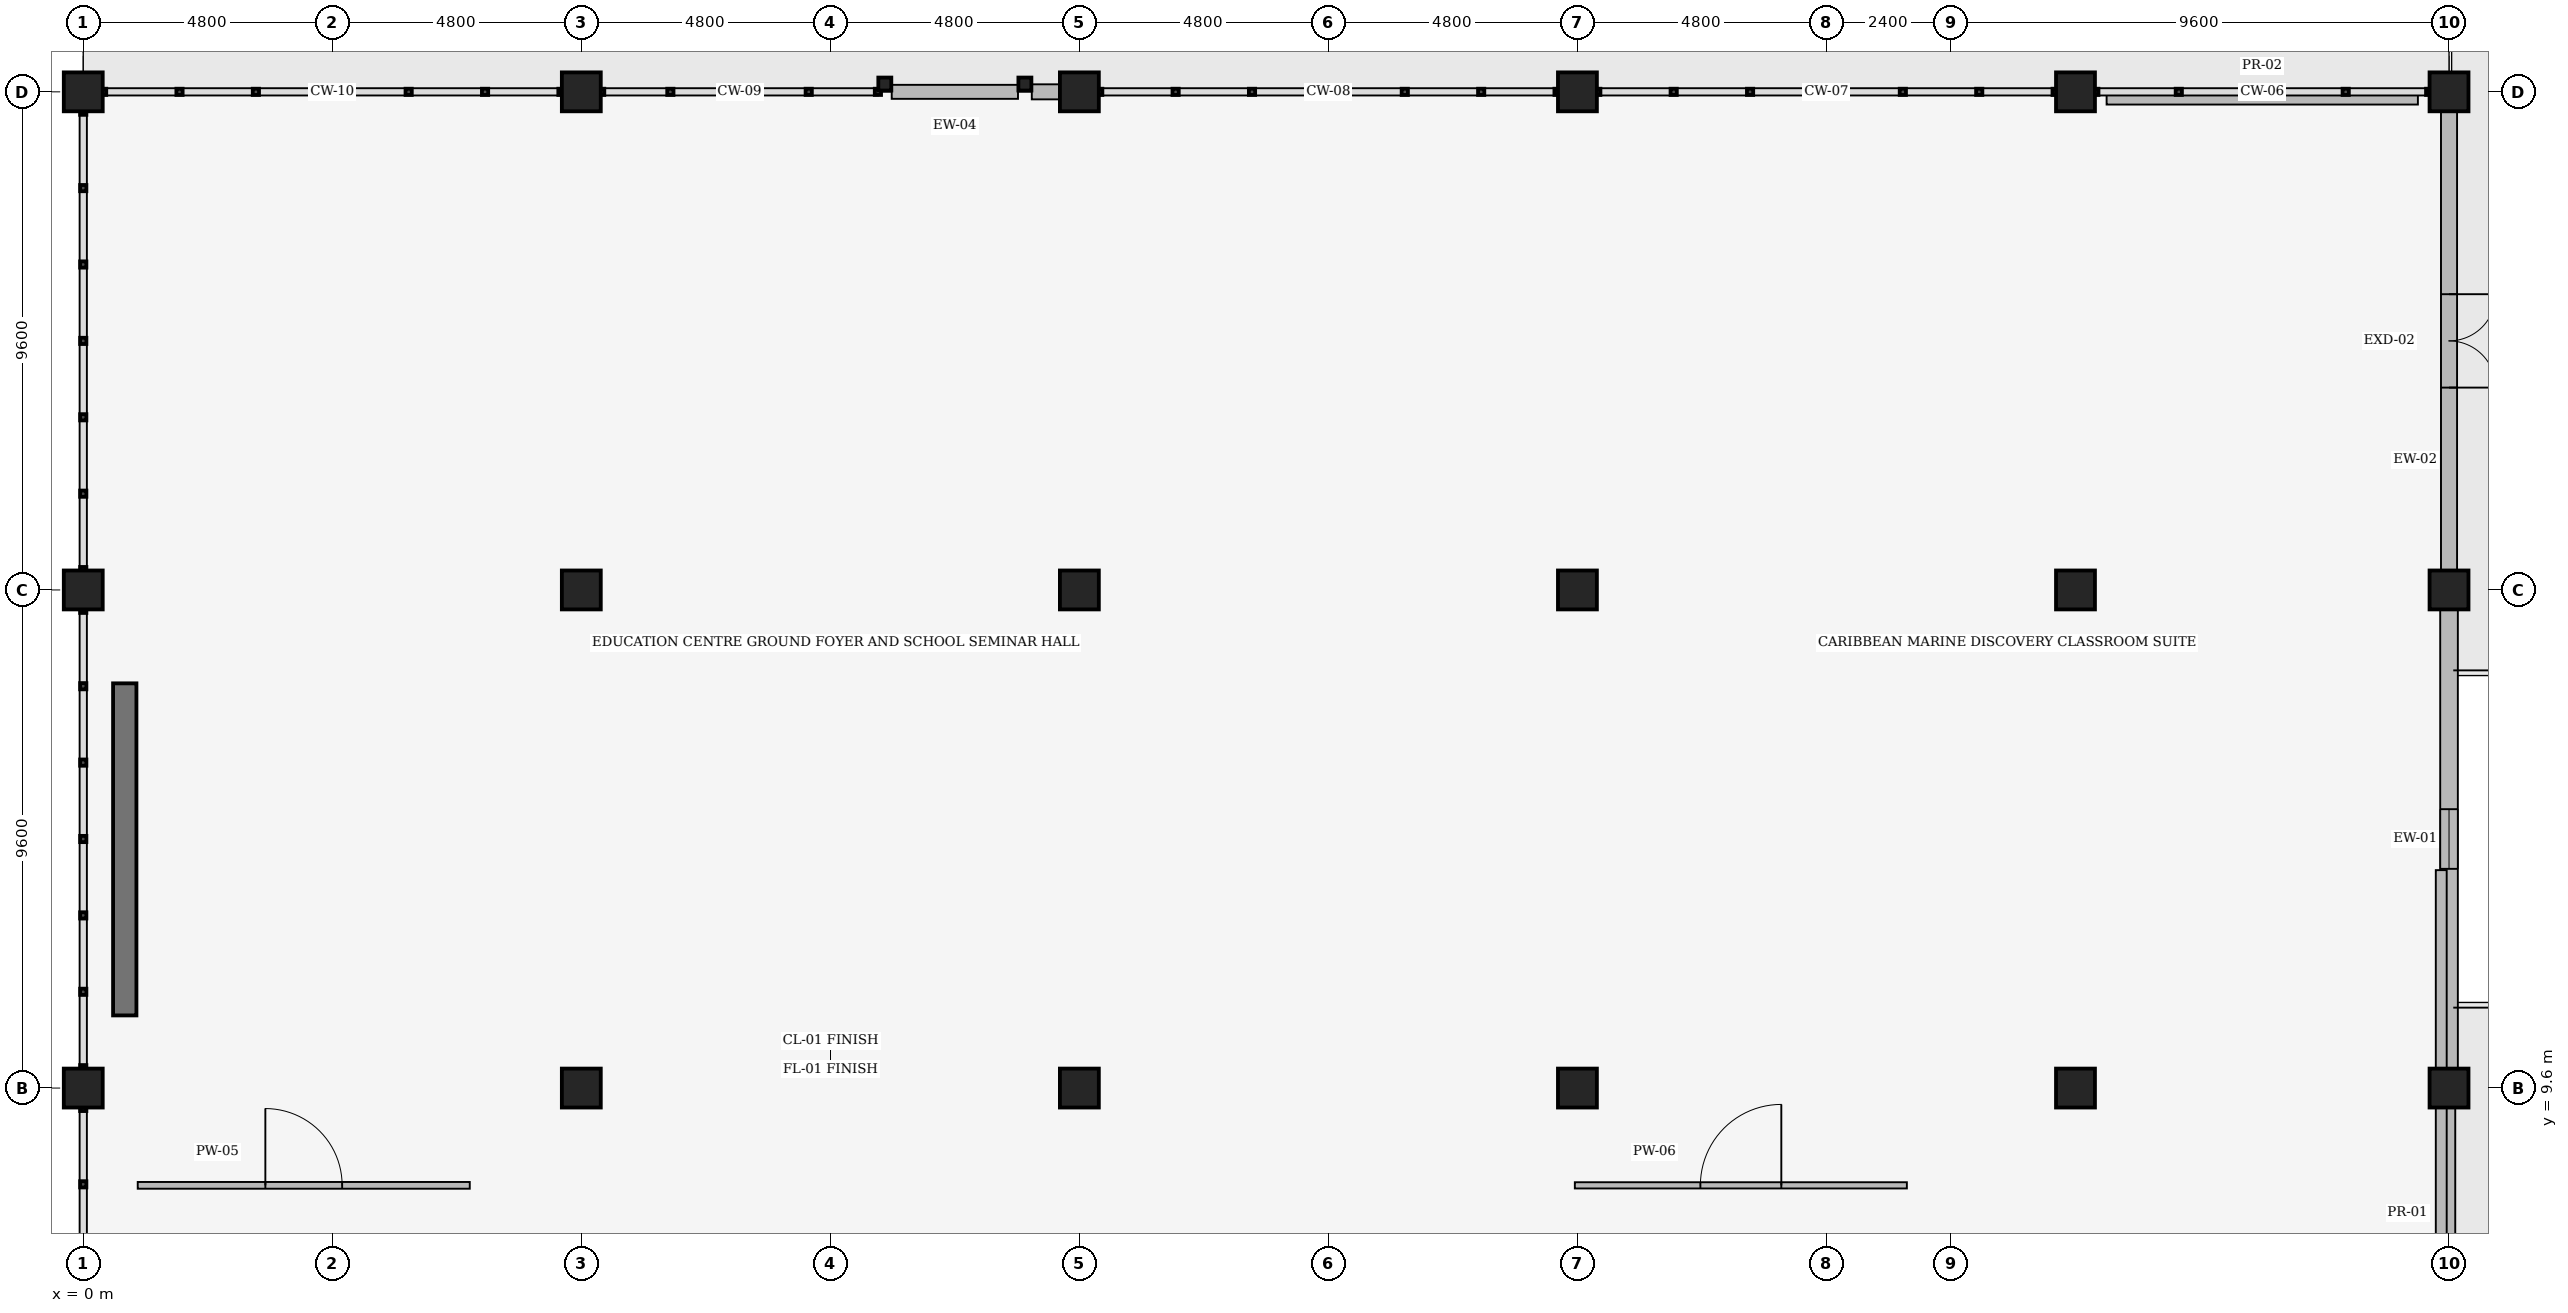
"""IFC4 building model, lengths in metres.
Left out: names, types, materials, properties, quantities, classifications, styles, units other than length and angle.
Written with IfcOpenShell. Run it as: python <this file> out.ifc"""

import sys

from ifc_helpers import new_model, si_unit, direction, frame, frame_2d, origin, origin_2d, place, context, subcontext, project, spatial, rectangle, hollow_rectangle, extrude, element, fill, save


model = new_model("IFC4")
c1 = context("Model", 3, precision=1e-05, world=origin(), true_north=direction((0.0, 1.0)))
c2 = subcontext(c1, "Body", "Model", "MODEL_VIEW")
j1 = project(units=[si_unit("LENGTHUNIT", "METRE"), si_unit("PLANEANGLEUNIT", "RADIAN")], contexts=[c1])
p1 = place(None, origin())
s1 = spatial("IfcSite", under=j1, at=p1, CompositionType="ELEMENT")
p2 = place(p1, origin())
s2 = spatial("IfcBuilding", under=s1, at=p2, CompositionType="ELEMENT")
p3 = place(p2, origin())
s3 = spatial("IfcBuildingStorey", under=s2, at=p3, CompositionType="ELEMENT", Elevation=0.0)
for number, where, z_axis, x_axis in (
    (1, (0.0, 9.6, 0.0), (0.0, 0.0, 1.0), (1.0, 0.0, 0.0)),
    (2, (0.0, 19.2, 0.0), (0.0, 0.0, 1.0), (1.0, 0.0, 0.0)),
    (3, (0.0, 28.8, 0.0), (0.0, 0.0, 1.0), (1.0, 0.0, 0.0)),
    (4, (9.6, 9.6, 0.0), (0.0, 0.0, 1.0), (1.0, 0.0, 0.0)),
    (5, (9.6, 19.2, 0.0), (0.0, 0.0, 1.0), (1.0, 0.0, 0.0)),
    (6, (9.6, 28.8, 0.0), (0.0, 0.0, 1.0), (1.0, 0.0, 0.0)),
):
    element("IfcColumn", number, at=place(p3, frame(where, z_axis=z_axis, x_axis=x_axis)), inside=s3, PredefinedType="COLUMN", context=c2, shape_type="SweptSolid", body=[
        extrude(rectangle(XDim=0.75, YDim=0.75, at=origin_2d()), origin(), (0.0, 0.0, 1.0), 5.4),
    ])
for number, where, z_axis, x_axis in (
    (7, (19.2, 9.6, -0.3), (0.0, 0.0, 1.0), (1.0, 0.0, 0.0)),
    (8, (19.2, 19.2, -0.3), (0.0, 0.0, 1.0), (1.0, 0.0, 0.0)),
):
    element("IfcColumn", number, at=place(p3, frame(where, z_axis=z_axis, x_axis=x_axis)), inside=s3, PredefinedType="COLUMN", context=c2, shape_type="SweptSolid", body=[
        extrude(rectangle(XDim=0.75, YDim=0.75, at=origin_2d()), origin(), (0.0, 0.0, 1.0), 5.7),
    ])
for number, where, z_axis, x_axis in (
    (9, (19.2, 28.8, 0.0), (0.0, 0.0, 1.0), (1.0, 0.0, 0.0)),
    (10, (28.8, 9.6, 0.0), (0.0, 0.0, 1.0), (1.0, 0.0, 0.0)),
    (11, (28.8, 19.2, 0.0), (0.0, 0.0, 1.0), (1.0, 0.0, 0.0)),
    (12, (28.8, 28.8, 0.0), (0.0, 0.0, 1.0), (1.0, 0.0, 0.0)),
    (13, (38.4, 9.6, 0.0), (0.0, 0.0, 1.0), (1.0, 0.0, 0.0)),
    (14, (38.4, 19.2, 0.0), (0.0, 0.0, 1.0), (1.0, 0.0, 0.0)),
    (15, (38.4, 28.8, 0.0), (0.0, 0.0, 1.0), (1.0, 0.0, 0.0)),
    (16, (45.6, 9.6, 0.0), (0.0, 0.0, 1.0), (1.0, 0.0, 0.0)),
    (17, (45.6, 19.2, 0.0), (0.0, 0.0, 1.0), (1.0, 0.0, 0.0)),
    (18, (45.6, 28.8, 0.0), (0.0, 0.0, 1.0), (1.0, 0.0, 0.0)),
):
    element("IfcColumn", number, at=place(p3, frame(where, z_axis=z_axis, x_axis=x_axis)), inside=s3, PredefinedType="COLUMN", context=c2, shape_type="SweptSolid", body=[
        extrude(rectangle(XDim=0.75, YDim=0.75, at=origin_2d()), origin(), (0.0, 0.0, 1.0), 5.4),
    ])
for number, where, z_axis, x_axis in (
    (19, (15.45, 28.95, 0.0), (0.0, 0.0, 1.0), (1.0, 0.0, 0.0)),
    (20, (18.15, 28.95, 0.0), (0.0, 0.0, 1.0), (1.0, 0.0, 0.0)),
):
    element("IfcColumn", number, at=place(p3, frame(where, z_axis=z_axis, x_axis=x_axis)), inside=s3, PredefinedType="COLUMN", context=c2, shape_type="SweptSolid", body=[
        extrude(hollow_rectangle(XDim=0.25, YDim=0.25, WallThickness=0.012, InnerFilletRadius=0.012, OuterFilletRadius=0.025, at=origin_2d()), origin(), (0.0, 0.0, 1.0), 4.651),
    ])
p4 = place(p3, frame((0.8, 11.0, 0.0), z_axis=(0.0, 0.0, 1.0), x_axis=(0.0, 1.0, 0.0)))
e21 = element("IfcWall", 21, at=p4, inside=s3, PredefinedType="SHEAR", context=c2, shape_type="SweptSolid", body=[
    extrude(rectangle(XDim=6.4, YDim=0.45, at=frame_2d((3.2, 0.0))), origin(), (0.0, 0.0, 1.0), 5.4),
])
p5 = place(p3, frame((45.6, 0.383, 0.0), z_axis=(0.0, 0.0, 1.0), x_axis=(0.0, 1.0, 0.0)))
e22 = element("IfcWall", 22, at=p5, inside=s3, PredefinedType="SOLIDWALL", context=c2, shape_type="SweptSolid", body=[
    extrude(rectangle(XDim=8.834, YDim=0.24, at=frame_2d((4.417, 0.0))), origin(), (0.0, 0.0, 1.0), 4.778),
])
p6 = place(p5, frame((5.417, 0.0, 0.0), z_axis=(0.0, 0.0, 1.0), x_axis=(-1.0, 0.0, 0.0)))
e23 = element("IfcOpeningElement", 23, at=p6, cuts=e22, PredefinedType="OPENING", context=c2, shape_type="SweptSolid", body=[
    extrude(rectangle(XDim=2.0, YDim=2.5, at=frame_2d((1.0, 1.25))), frame((0.0, 0.13, 0.0), z_axis=(0.0, -1.0, 0.0), x_axis=(1.0, 0.0, 0.0)), (0.0, 0.0, 1.0), 0.26),
])
p7 = place(p3, frame((45.6, 9.983, 0.0), z_axis=(0.0, 0.0, 1.0), x_axis=(0.0, 1.0, 0.0)))
e24 = element("IfcWall", 24, at=p7, inside=s3, PredefinedType="SOLIDWALL", context=c2, shape_type="SweptSolid", body=[
    extrude(rectangle(XDim=8.834, YDim=0.34, at=frame_2d((4.417, 0.0))), origin(), (0.0, 0.0, 1.0), 4.778),
])
p8 = place(p7, frame((3.842, 0.0, 0.95)))
e25 = element("IfcOpeningElement", 25, at=p8, cuts=e24, PredefinedType="OPENING", context=c2, shape_type="SweptSolid", body=[
    extrude(rectangle(XDim=1.15, YDim=1.5, at=frame_2d((0.575, 0.75))), frame((0.0, 0.18, 0.0), z_axis=(0.0, -1.0, 0.0), x_axis=(1.0, 0.0, 0.0)), (0.0, 0.0, 1.0), 0.36),
])
p9 = place(p3, frame((45.6, 19.583, 0.0), z_axis=(0.0, 0.0, 1.0), x_axis=(0.0, 1.0, 0.0)))
e26 = element("IfcWall", 26, at=p9, inside=s3, PredefinedType="SOLIDWALL", context=c2, shape_type="SweptSolid", body=[
    extrude(rectangle(XDim=8.834, YDim=0.31, at=frame_2d((4.417, 0.0))), origin(), (0.0, 0.0, 1.0), 4.778),
])
p10 = place(p9, frame((5.317, 0.0, 0.0), z_axis=(0.0, 0.0, 1.0), x_axis=(-1.0, 0.0, 0.0)))
e27 = element("IfcOpeningElement", 27, at=p10, cuts=e26, PredefinedType="OPENING", context=c2, shape_type="SweptSolid", body=[
    extrude(rectangle(XDim=1.8, YDim=2.4, at=frame_2d((0.9, 1.2))), frame((0.0, 0.165, 0.0), z_axis=(0.0, -1.0, 0.0), x_axis=(1.0, 0.0, 0.0)), (0.0, 0.0, 1.0), 0.33),
])
p11 = place(p3, frame((18.817, 28.8, 0.0), z_axis=(0.0, 0.0, 1.0), x_axis=(-1.0, 0.0, 0.0)))
e28 = element("IfcWall", 28, at=p11, inside=s3, PredefinedType="SOLIDWALL", context=c2, shape_type="SweptSolid", body=[
    extrude(rectangle(XDim=0.534, YDim=0.29, at=frame_2d((0.267, 0.0))), origin(), (0.0, 0.0, 1.0), 4.621),
])
p12 = place(p3, frame((18.017, 28.8, 0.0), z_axis=(0.0, 0.0, 1.0), x_axis=(-1.0, 0.0, 0.0)))
e29 = element("IfcWall", 29, at=p12, inside=s3, PredefinedType="SOLIDWALL", context=c2, shape_type="SweptSolid", body=[
    extrude(rectangle(XDim=2.434, YDim=0.27, at=frame_2d((1.217, 0.0))), origin(), (0.0, 0.0, 1.0), 4.621),
])
p13 = place(p3, frame((45.45, 0.6, 5.4), z_axis=(0.0, 0.0, 1.0), x_axis=(0.0, 1.0, 0.0)))
e30 = element("IfcWall", 30, at=p13, inside=s3, PredefinedType="PARAPET", context=c2, shape_type="SweptSolid", body=[
    extrude(rectangle(XDim=13.2, YDim=0.21, at=frame_2d((6.6, 0.0))), origin(), (0.0, 0.0, 1.0), 0.55),
])
p14 = place(p3, frame((39.0, 28.65, 5.4), z_axis=(0.0, 0.0, 1.0), x_axis=(1.0, 0.0, 0.0)))
e31 = element("IfcWall", 31, at=p14, inside=s3, PredefinedType="PARAPET", context=c2, shape_type="SweptSolid", body=[
    extrude(rectangle(XDim=6.0, YDim=0.19, at=frame_2d((3.0, 0.0))), origin(), (0.0, 0.0, 1.0), 0.55),
])
p15 = place(p3, frame((1.05, 7.725, 0.0), z_axis=(0.0, 0.0, 1.0), x_axis=(1.0, 0.0, 0.0)))
e32 = element("IfcWall", 32, at=p15, inside=s3, PredefinedType="PARTITIONING", context=c2, shape_type="SweptSolid", body=[
    extrude(rectangle(XDim=6.4, YDim=0.13, at=frame_2d((3.2, 0.0))), origin(), (0.0, 0.0, 1.0), 5.04),
])
p16 = place(p15, frame((2.46, 0.0, 0.0)))
e33 = element("IfcOpeningElement", 33, at=p16, cuts=e32, PredefinedType="OPENING", context=c2, shape_type="SweptSolid", body=[
    extrude(rectangle(XDim=1.48, YDim=2.3, at=frame_2d((0.74, 1.15))), frame((0.0, 0.075, 0.0), z_axis=(0.0, -1.0, 0.0), x_axis=(1.0, 0.0, 0.0)), (0.0, 0.0, 1.0), 0.15),
])
p17 = place(p3, frame((28.75, 7.725, 0.0), z_axis=(0.0, 0.0, 1.0), x_axis=(1.0, 0.0, 0.0)))
e34 = element("IfcWall", 34, at=p17, inside=s3, PredefinedType="PARTITIONING", context=c2, shape_type="SweptSolid", body=[
    extrude(rectangle(XDim=6.4, YDim=0.12, at=frame_2d((3.2, 0.0))), origin(), (0.0, 0.0, 1.0), 4.597),
])
p18 = place(p17, frame((2.42, 0.0, 0.0)))
e35 = element("IfcOpeningElement", 35, at=p18, cuts=e34, PredefinedType="OPENING", context=c2, shape_type="SweptSolid", body=[
    extrude(rectangle(XDim=1.56, YDim=2.32, at=frame_2d((0.78, 1.16))), frame((0.0, 0.07, 0.0), z_axis=(0.0, -1.0, 0.0), x_axis=(1.0, 0.0, 0.0)), (0.0, 0.0, 1.0), 0.14),
])
p19 = place(p10, origin())
e36 = element("IfcDoor", 36, at=p19, inside=s3, OperationType="DOUBLE_DOOR_SINGLE_SWING", PredefinedType="DOOR", context=c2, shape_type="SweptSolid", body=[
    extrude(rectangle(XDim=1.8, YDim=2.4, at=frame_2d((0.9, 1.2))), frame((0.0, 0.025, 0.0), z_axis=(0.0, -1.0, 0.0), x_axis=(1.0, 0.0, 0.0)), (0.0, 0.0, 1.0), 0.05),
])
fill(e27, e36)
p20 = place(p8, origin())
e37 = element("IfcWindow", 37, at=p20, inside=s3, PartitioningType="SINGLE_PANEL", PredefinedType="WINDOW", context=c2, shape_type="SweptSolid", body=[
    extrude(rectangle(XDim=1.15, YDim=1.5, at=frame_2d((0.575, 0.75))), frame((0.0, 0.03, 0.0), z_axis=(0.0, -1.0, 0.0), x_axis=(1.0, 0.0, 0.0)), (0.0, 0.0, 1.0), 0.06),
])
fill(e25, e37)
p21 = place(p16, origin())
e38 = element("IfcDoor", 38, at=p21, inside=s3, OperationType="SINGLE_SWING_LEFT", PredefinedType="DOOR", context=c2, shape_type="SweptSolid", body=[
    extrude(rectangle(XDim=1.48, YDim=2.3, at=frame_2d((0.74, 1.15))), frame((0.0, 0.025, 0.0), z_axis=(0.0, -1.0, 0.0), x_axis=(1.0, 0.0, 0.0)), (0.0, 0.0, 1.0), 0.05),
])
fill(e33, e38)
p22 = place(p18, origin())
e39 = element("IfcDoor", 39, at=p22, inside=s3, OperationType="SINGLE_SWING_RIGHT", PredefinedType="DOOR", context=c2, shape_type="SweptSolid", body=[
    extrude(rectangle(XDim=1.56, YDim=2.32, at=frame_2d((0.78, 1.16))), frame((0.0, 0.025, 0.0), z_axis=(0.0, -1.0, 0.0), x_axis=(1.0, 0.0, 0.0)), (0.0, 0.0, 1.0), 0.05),
])
fill(e35, e39)
save(model, sys.argv[1])
